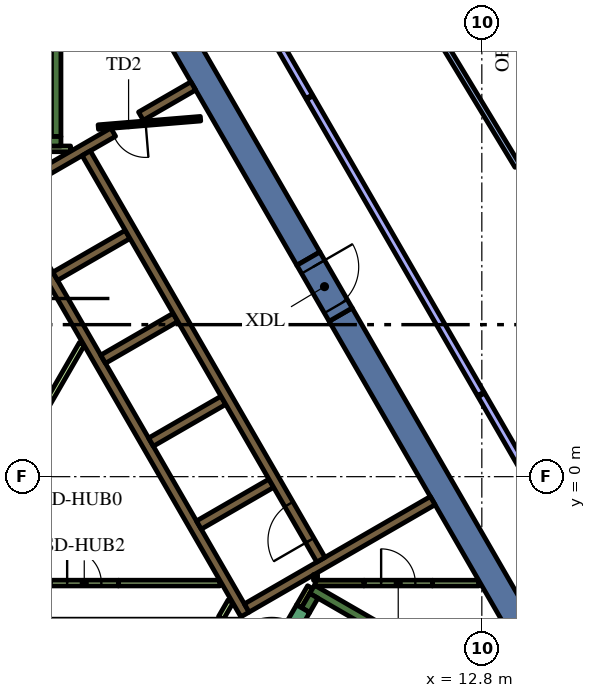
"""IFC4 building model, lengths in metres.
Left out: names, types, materials, properties, quantities, classifications, styles, units other than length and angle.
Written with IfcOpenShell. Run it as: python <this file> out.ifc"""

import sys

from ifc_helpers import new_model, si_unit, direction, frame, frame_2d, origin, place, context, subcontext, project, spatial, polyline, rectangle, outline, extrude, element, fill, save


model = new_model("IFC4")
c1 = context("Model", 3, precision=1e-05, world=origin(), true_north=direction((0.0, 1.0)))
c2 = subcontext(c1, "Body", "Model", "MODEL_VIEW")
j1 = project(units=[si_unit("LENGTHUNIT", "METRE"), si_unit("PLANEANGLEUNIT", "RADIAN")], contexts=[c1])
p1 = place(None, origin())
s1 = spatial("IfcSite", under=j1, at=p1, CompositionType="ELEMENT")
p2 = place(p1, origin())
s2 = spatial("IfcBuilding", under=s1, at=p2, CompositionType="ELEMENT")
p3 = place(p2, frame((0.0, 0.0, 210.0)))
s3 = spatial("IfcBuildingStorey", under=s2, at=p3, CompositionType="ELEMENT", Elevation=210.0)
for number, where, z_axis, x_axis in (
    (1, (9.085, 4.264, 0.0), (0.0, 0.0, 1.0), (0.5, -0.866, 0.0)),
    (2, (8.235, 5.736, 0.0), (0.0, 0.0, 1.0), (-0.5, 0.866, 0.0)),
):
    element("IfcWall", number, at=place(p3, frame(where, z_axis=z_axis, x_axis=x_axis)), inside=s3, PredefinedType="SOLIDWALL", context=c2, shape_type="SweptSolid", body=[
        extrude(rectangle(XDim=12.472, YDim=0.7, at=frame_2d((6.236, 0.0))), origin(), (0.0, 0.0, 1.0), 4.2),
    ])
p4 = place(p3, frame((8.334, -2.964, 0.0), z_axis=(0.0, 0.0, 1.0), x_axis=(0.866016039709, -0.500016218704, 0.0)))
e3 = element("IfcWall", 3, at=p4, inside=s3, PredefinedType="SOLIDWALL", context=c2, shape_type="SweptSolid", body=[
    extrude(rectangle(XDim=7.05, YDim=0.25, at=frame_2d((3.525, 0.0))), origin(), (0.0, 0.0, 1.0), 4.2),
])
p5 = place(p3, frame((8.163, -3.511, 0.0), z_axis=(0.0, 0.0, 1.0), x_axis=(0.500127794843, 0.865951608824, 0.0)))
e4 = element("IfcWall", 4, at=p5, inside=s3, PredefinedType="SOLIDWALL", context=c2, shape_type="SweptSolid", body=[
    extrude(rectangle(XDim=0.435, YDim=0.25, at=frame_2d((0.217, 0.0))), origin(), (0.0, 0.0, 1.0), 4.2),
])
p6 = place(p3, frame((1.6, 8.95, 0.0), z_axis=(0.0, 0.0, 1.0), x_axis=(0.0, 1.0, 0.0)))
e5 = element("IfcWall", 5, at=p6, inside=s3, PredefinedType="SOLIDWALL", context=c2, shape_type="SweptSolid", body=[
    extrude(rectangle(XDim=6.8, YDim=0.25, at=frame_2d((3.4, 0.0))), origin(), (0.0, 0.0, 1.0), 4.2),
])
p7 = place(p3, frame((1.05, 8.825, 0.0), z_axis=(0.0, 0.0, 1.0), x_axis=(1.0, 0.0, 0.0)))
e6 = element("IfcWall", 6, at=p7, inside=s3, PredefinedType="SOLIDWALL", context=c2, shape_type="SweptSolid", body=[
    extrude(rectangle(XDim=0.675, YDim=0.25, at=frame_2d((0.337, 0.0))), origin(), (0.0, 0.0, 1.0), 4.2),
])
p8 = place(p3, origin())
e7 = element("IfcWall", 7, at=p8, inside=s3, PredefinedType="SOLIDWALL", context=c2, shape_type="SweptSolid", body=[
    extrude(outline(polyline([(0.332, 6.925), (0.335, 6.925), (0.335, 6.925), (0.335, 6.925), (0.335, 7.075), (0.335, 7.075), (0.335, 7.075), (0.245, 7.075), (0.035, 7.439), (0.252, 7.564), (0.377, 7.348), (1.512, 5.382), (1.637, 5.165), (2.221, 4.153), (2.771, 3.199), (2.896, 2.983), (3.138, 2.564), (4.031, 1.017), (4.156, 0.801), (5.292, -1.165), (5.417, -1.382), (6.073, -2.519), (6.552, -3.348), (6.677, -3.564), (6.46, -3.689), (0.332, 6.925)])), origin(), (0.0, 0.0, 1.0), 4.2),
])
p9 = place(p3, frame((3.1, 9.064, 0.0), z_axis=(0.0, 0.0, 1.0), x_axis=(-0.866030133475, -0.499991807846, 0.0)))
e8 = element("IfcWall", 8, at=p9, inside=s3, PredefinedType="SOLIDWALL", context=c2, shape_type="SweptSolid", body=[
    extrude(rectangle(XDim=3.217, YDim=0.25, at=frame_2d((1.608, 0.0))), origin(), (0.0, 0.0, 1.0), 4.2),
])
p10 = place(p3, frame((1.574, 5.274, 0.0), z_axis=(0.0, 0.0, 1.0), x_axis=(0.866028486751, 0.499994660107, 0.0)))
e9 = element("IfcWall", 9, at=p10, inside=s3, PredefinedType="SOLIDWALL", context=c2, shape_type="SweptSolid", body=[
    extrude(rectangle(XDim=2.2, YDim=0.25, at=frame_2d((1.1, 0.0))), origin(), (0.0, 0.0, 1.0), 4.2),
])
for number, where, z_axis, x_axis in (
    (10, (2.834, 3.091, 0.0), (0.0, 0.0, 1.0), (0.866, 0.5, 0.0)),
    (11, (4.094, 0.909, 0.0), (0.0, 0.0, 1.0), (0.866, 0.5, 0.0)),
    (12, (5.354, -1.274, 0.0), (0.0, 0.0, 1.0), (0.866, 0.5, 0.0)),
):
    element("IfcWall", number, at=place(p3, frame(where, z_axis=z_axis, x_axis=x_axis)), inside=s3, PredefinedType="SOLIDWALL", context=c2, shape_type="SweptSolid", body=[
        extrude(rectangle(XDim=2.2, YDim=0.25, at=frame_2d((1.1, 0.0))), origin(), (0.0, 0.0, 1.0), 4.2),
    ])
p11 = place(p3, frame((11.507, -0.631, 0.0), z_axis=(0.0, 0.0, 1.0), x_axis=(-0.866011447264, -0.500024172624, 0.0)))
e13 = element("IfcWall", 13, at=p11, inside=s3, PredefinedType="SOLIDWALL", context=c2, shape_type="SweptSolid", body=[
    extrude(rectangle(XDim=5.65, YDim=0.25, at=frame_2d((2.825, 0.0))), origin(), (0.0, 0.0, 1.0), 4.2),
])
p12 = place(p3, frame((3.83, 9.486, 0.0), z_axis=(0.0, 0.0, 1.0), x_axis=(0.865986202621, 0.500067892261, 0.0)))
e14 = element("IfcWall", 14, at=p12, inside=s3, PredefinedType="SOLIDWALL", context=c2, shape_type="SweptSolid", body=[
    extrude(rectangle(XDim=1.591, YDim=0.25, at=frame_2d((0.795, 0.0))), origin(), (0.0, 0.0, 1.0), 4.2),
])
for number, where, z_axis, x_axis in (
    (15, (0.941, 1.179, 0.0), (0.0, 0.0, 1.0), (0.5, 0.866, 0.0)),
    (16, (3.238, -2.8, 0.0), (0.0, 0.0, 1.0), (1.0, 0.0, 0.0)),
):
    element("IfcWall", number, at=place(p3, frame(where, z_axis=z_axis, x_axis=x_axis)), inside=s3, PredefinedType="PARTITIONING", context=c2, shape_type="SweptSolid", body=[
        extrude(rectangle(XDim=2.672, YDim=0.15, at=frame_2d((1.336, 0.0))), origin(), (0.0, 0.0, 1.0), 3.45),
    ])
p13 = place(p3, frame((1.05, 8.625, 0.0), z_axis=(0.0, 0.0, 1.0), x_axis=(1.0, 0.0, 0.0)))
e17 = element("IfcWall", 17, at=p13, inside=s3, PredefinedType="PARTITIONING", context=c2, shape_type="SweptSolid", body=[
    extrude(rectangle(XDim=0.929, YDim=0.15, at=frame_2d((0.464, 0.0))), origin(), (0.0, 0.0, 1.0), 3.45),
])
p14 = place(p3, frame((8.412, -2.8, 0.0), z_axis=(0.0, 0.0, 1.0), x_axis=(1.0, 0.0, 0.0)))
e18 = element("IfcWall", 18, at=p14, inside=s3, PredefinedType="PARTITIONING", context=c2, shape_type="SweptSolid", body=[
    extrude(rectangle(XDim=1.288, YDim=0.15, at=frame_2d((0.644, 0.0))), origin(), (0.0, 0.0, 1.0), 4.2),
])
p15 = place(p3, frame((8.37, -2.65, 0.0), z_axis=(0.0, 0.0, 1.0), x_axis=(1.0, 0.0, 0.0)))
e19 = element("IfcWall", 19, at=p15, inside=s3, PredefinedType="PARTITIONING", context=c2, shape_type="SweptSolid", body=[
    extrude(rectangle(XDim=0.108, YDim=0.15, at=frame_2d((0.054, 0.0))), origin(), (0.0, 0.0, 1.0), 4.2),
])
p16 = place(p3, frame((8.281, -2.907, 0.0), z_axis=(0.0, 0.0, 1.0), x_axis=(-0.500193841991, -0.86591346013, 0.0)))
e20 = element("IfcWall", 20, at=p16, inside=s3, PredefinedType="PARTITIONING", context=c2, shape_type="SweptSolid", body=[
    extrude(rectangle(XDim=0.583, YDim=0.15, at=frame_2d((0.292, 0.0))), origin(), (0.0, 0.0, 1.0), 4.2),
])
p17 = place(p3, frame((11.5, -2.801, 0.0), z_axis=(0.0, 0.0, 1.0), x_axis=(1.0, 0.0, 0.0)))
e21 = element("IfcWall", 21, at=p17, inside=s3, PredefinedType="PARTITIONING", context=c2, shape_type="SweptSolid", body=[
    extrude(rectangle(XDim=1.222, YDim=0.15, at=frame_2d((0.611, 0.0))), origin(), (0.0, 0.0, 1.0), 3.45),
])
p18 = place(p3, frame((5.936, -3.718, 0.0), z_axis=(0.0, 0.0, 1.0), x_axis=(0.499890179513, 0.866088799389, 0.0)))
e22 = element("IfcWall", 22, at=p18, inside=s3, PredefinedType="PARTITIONING", context=c2, shape_type="SweptSolid", body=[
    extrude(rectangle(XDim=0.504, YDim=0.15, at=frame_2d((0.252, 0.0))), origin(), (0.0, 0.0, 1.0), 3.45),
])
p19 = place(p3, frame((8.565, -2.185, 0.0), z_axis=(0.0, 0.0, 1.0), x_axis=(-0.499997954832, 0.866026584559, 0.0)))
e23 = element("IfcWall", 23, at=p19, inside=s3, PredefinedType="SOLIDWALL", context=c2, shape_type="SweptSolid", body=[
    extrude(rectangle(XDim=12.35, YDim=0.25, at=frame_2d((6.175, 0.0))), origin(), (0.0, 0.0, 1.0), 4.2),
])
p20 = place(p19, frame((0.585, 0.0, 0.0)))
e24 = element("IfcOpeningElement", 24, at=p20, cuts=e23, PredefinedType="OPENING", context=c2, shape_type="SweptSolid", body=[
    extrude(rectangle(XDim=1.1, YDim=2.1, at=frame_2d((0.55, 1.05))), frame((0.0, 0.135, 0.0), z_axis=(0.0, -1.0, 0.0), x_axis=(1.0, 0.0, 0.0)), (0.0, 0.0, 1.0), 0.27),
])
p21 = place(p3, frame((7.048, -5.292, 0.0), z_axis=(0.0, 0.0, 1.0), x_axis=(0.49994051562, 0.866059744384, 0.0)))
e25 = element("IfcWall", 25, at=p21, inside=s3, PredefinedType="SOLIDWALL", context=c2, shape_type="SweptSolid", body=[
    extrude(rectangle(XDim=2.1, YDim=0.4, at=frame_2d((1.05, 0.0))), origin(), (0.0, 0.0, 1.0), 4.2),
])
p22 = place(p21, frame((0.45, 0.0, 0.0)))
e26 = element("IfcOpeningElement", 26, at=p22, cuts=e25, PredefinedType="OPENING", context=c2, shape_type="SweptSolid", body=[
    extrude(rectangle(XDim=1.2, YDim=2.1, at=frame_2d((0.6, 1.05))), frame((0.0, 0.21, 0.0), z_axis=(0.0, -1.0, 0.0), x_axis=(1.0, 0.0, 0.0)), (0.0, 0.0, 1.0), 0.42),
])
p23 = place(p3, frame((5.398, 9.419, 0.0), z_axis=(0.0, 0.0, 1.0), x_axis=(-0.996653416376, -0.081743303248, 0.0)))
e27 = element("IfcWall", 27, at=p23, inside=s3, PredefinedType="PARTITIONING", context=c2, shape_type="SweptSolid", body=[
    extrude(rectangle(XDim=2.7, YDim=0.12, at=frame_2d((1.35, 0.0))), origin(), (0.0, 0.0, 1.0), 3.45),
])
p24 = place(p23, frame((1.45, 0.0, 0.0)))
e28 = element("IfcOpeningElement", 28, at=p24, cuts=e27, PredefinedType="OPENING", context=c2, shape_type="SweptSolid", body=[
    extrude(rectangle(XDim=0.9, YDim=2.1, at=frame_2d((0.45, 1.05))), frame((0.0, 0.07, 0.0), z_axis=(0.0, -1.0, 0.0), x_axis=(1.0, 0.0, 0.0)), (0.0, 0.0, 1.0), 0.14),
])
p25 = place(p3, frame((8.235, 5.736, 0.0), z_axis=(0.0, 0.0, 1.0), x_axis=(0.499954529098, -0.86605165483, 0.0)))
e29 = element("IfcWall", 29, at=p25, inside=s3, PredefinedType="SOLIDWALL", context=c2, shape_type="SweptSolid", body=[
    extrude(rectangle(XDim=1.7, YDim=0.7, at=frame_2d((0.85, 0.0))), origin(), (0.0, 0.0, 1.0), 4.2),
])
p26 = place(p25, frame((0.25, 0.0, 0.0)))
e30 = element("IfcOpeningElement", 30, at=p26, cuts=e29, PredefinedType="OPENING", context=c2, shape_type="SweptSolid", body=[
    extrude(rectangle(XDim=1.2, YDim=2.1, at=frame_2d((0.6, 1.05))), frame((0.0, 0.36, 0.0), z_axis=(0.0, -1.0, 0.0), x_axis=(1.0, 0.0, 0.0)), (0.0, 0.0, 1.0), 0.72),
])
p27 = place(p3, frame((1.438, -2.8, 0.0), z_axis=(0.0, 0.0, 1.0), x_axis=(1.0, 0.0, 0.0)))
e31 = element("IfcWall", 31, at=p27, inside=s3, PredefinedType="PARTITIONING", context=c2, shape_type="SweptSolid", body=[
    extrude(rectangle(XDim=1.8, YDim=0.15, at=frame_2d((0.9, 0.0))), origin(), (0.0, 0.0, 1.0), 3.45),
])
p28 = place(p27, frame((0.45, 0.0, 0.0)))
e32 = element("IfcOpeningElement", 32, at=p28, cuts=e31, PredefinedType="OPENING", context=c2, shape_type="SweptSolid", body=[
    extrude(rectangle(XDim=0.9, YDim=2.1, at=frame_2d((0.45, 1.05))), frame((0.0, 0.085, 0.0), z_axis=(0.0, -1.0, 0.0), x_axis=(1.0, 0.0, 0.0)), (0.0, 0.0, 1.0), 0.17),
])
p29 = place(p3, frame((9.7, -2.8, 0.0), z_axis=(0.0, 0.0, 1.0), x_axis=(1.0, 0.0, 0.0)))
e33 = element("IfcWall", 33, at=p29, inside=s3, PredefinedType="PARTITIONING", context=c2, shape_type="SweptSolid", body=[
    extrude(rectangle(XDim=1.8, YDim=0.15, at=frame_2d((0.9, 0.0))), origin(), (0.0, 0.0, 1.0), 3.45),
])
p30 = place(p29, frame((0.45, 0.0, 0.0)))
e34 = element("IfcOpeningElement", 34, at=p30, cuts=e33, PredefinedType="OPENING", context=c2, shape_type="SweptSolid", body=[
    extrude(rectangle(XDim=0.9, YDim=2.1, at=frame_2d((0.45, 1.05))), frame((0.0, 0.085, 0.0), z_axis=(0.0, -1.0, 0.0), x_axis=(1.0, 0.0, 0.0)), (0.0, 0.0, 1.0), 0.17),
])
p31 = place(p3, frame((13.737, 8.178, 0.0), z_axis=(0.0, 0.0, 1.0), x_axis=(-0.517884383874, 0.855450620983, 0.0)))
e35 = element("IfcWall", 35, at=p31, inside=s3, PredefinedType="PARTITIONING", context=c2, shape_type="SweptSolid", body=[
    extrude(rectangle(XDim=6.043, YDim=0.15, at=frame_2d((3.021, 0.0))), origin(), (0.0, 0.0, 1.0), 3.45),
])
p32 = place(p3, frame((12.772, 2.178, 0.0), z_axis=(0.0, 0.0, 1.0), x_axis=(-0.5000018851, 0.866024315419, 0.0)))
e36 = element("IfcWall", 36, at=p32, inside=s3, PredefinedType="PARTITIONING", context=c2, shape_type="SweptSolid", body=[
    extrude(rectangle(XDim=9.0, YDim=0.2, at=frame_2d((4.5, 0.0))), origin(), (0.0, 0.0, 1.0), 3.45),
])
p33 = place(p3, frame((8.257, 9.998, 0.0), z_axis=(0.0, 0.0, 1.0), x_axis=(-0.499998405424, 0.866026324412, 0.0)))
e37 = element("IfcWall", 37, at=p33, inside=s3, PredefinedType="PARTITIONING", context=c2, shape_type="SweptSolid", body=[
    extrude(rectangle(XDim=9.267, YDim=0.2, at=frame_2d((4.633, 0.0))), origin(), (0.0, 0.0, 1.0), 3.45),
])
p34 = place(p3, frame((17.681, -6.324, 0.0), z_axis=(0.0, 0.0, 1.0), x_axis=(-0.500021153861, 0.866013190252, 0.0)))
e38 = element("IfcWall", 38, at=p34, inside=s3, PredefinedType="PARTITIONING", context=c2, shape_type="SweptSolid", body=[
    extrude(rectangle(XDim=9.787, YDim=0.2, at=frame_2d((4.894, 0.0))), origin(), (0.0, 0.0, 1.0), 3.45),
])
p35 = place(p34, frame((4.4, 0.0, 0.0)))
e39 = element("IfcOpeningElement", 39, at=p35, cuts=e38, PredefinedType="OPENING", context=c2, shape_type="SweptSolid", body=[
    extrude(rectangle(XDim=1.0, YDim=2.1, at=frame_2d((0.5, 1.05))), frame((0.0, 0.11, 0.0), z_axis=(0.0, -1.0, 0.0), x_axis=(1.0, 0.0, 0.0)), (0.0, 0.0, 1.0), 0.22),
])
p36 = place(p20, origin())
e40 = element("IfcDoor", 40, at=p36, inside=s3, OperationType="DOUBLE_DOOR_SLIDING", PredefinedType="DOOR", context=c2, shape_type="SweptSolid", body=[
    extrude(rectangle(XDim=1.1, YDim=2.1, at=frame_2d((0.55, 1.05))), frame((0.0, 0.025, 0.0), z_axis=(0.0, -1.0, 0.0), x_axis=(1.0, 0.0, 0.0)), (0.0, 0.0, 1.0), 0.05),
])
fill(e24, e40)
p37 = place(p24, origin())
e41 = element("IfcDoor", 41, at=p37, inside=s3, OperationType="SINGLE_SWING_LEFT", PredefinedType="DOOR", context=c2, shape_type="SweptSolid", body=[
    extrude(rectangle(XDim=0.9, YDim=2.1, at=frame_2d((0.45, 1.05))), frame((0.0, 0.025, 0.0), z_axis=(0.0, -1.0, 0.0), x_axis=(1.0, 0.0, 0.0)), (0.0, 0.0, 1.0), 0.05),
])
fill(e28, e41)
p38 = place(p26, origin())
e42 = element("IfcDoor", 42, at=p38, inside=s3, OperationType="SINGLE_SWING_LEFT", PredefinedType="DOOR", context=c2, shape_type="SweptSolid", body=[
    extrude(rectangle(XDim=1.2, YDim=2.1, at=frame_2d((0.6, 1.05))), frame((0.0, 0.025, 0.0), z_axis=(0.0, -1.0, 0.0), x_axis=(1.0, 0.0, 0.0)), (0.0, 0.0, 1.0), 0.05),
])
fill(e30, e42)
p39 = place(p28, origin())
e43 = element("IfcDoor", 43, at=p39, inside=s3, OperationType="SINGLE_SWING_LEFT", PredefinedType="DOOR", context=c2, shape_type="SweptSolid", body=[
    extrude(rectangle(XDim=0.9, YDim=2.1, at=frame_2d((0.45, 1.05))), frame((0.0, 0.025, 0.0), z_axis=(0.0, -1.0, 0.0), x_axis=(1.0, 0.0, 0.0)), (0.0, 0.0, 1.0), 0.05),
])
fill(e32, e43)
p40 = place(p30, origin())
e44 = element("IfcDoor", 44, at=p40, inside=s3, OperationType="SINGLE_SWING_LEFT", PredefinedType="DOOR", context=c2, shape_type="SweptSolid", body=[
    extrude(rectangle(XDim=0.9, YDim=2.1, at=frame_2d((0.45, 1.05))), frame((0.0, 0.025, 0.0), z_axis=(0.0, -1.0, 0.0), x_axis=(1.0, 0.0, 0.0)), (0.0, 0.0, 1.0), 0.05),
])
fill(e34, e44)
save(model, sys.argv[1])
